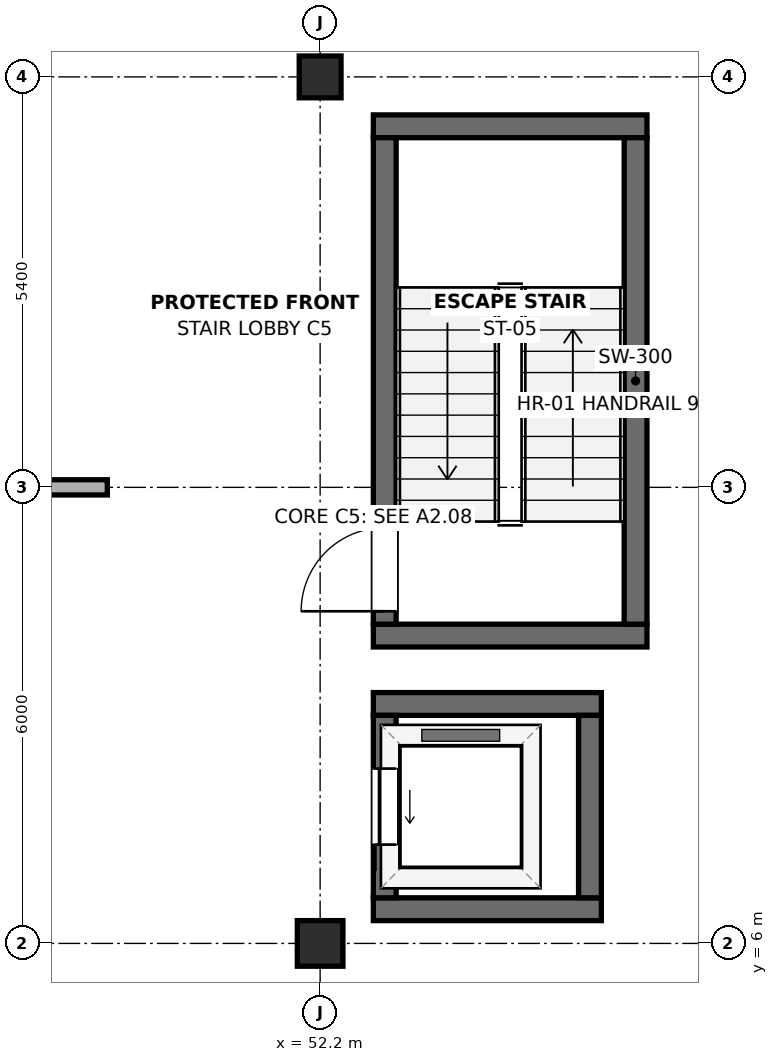
"""IFC4 building model, lengths in metres.
Left out: names, types, materials, properties, quantities, classifications, styles, units other than length and angle.
Written with IfcOpenShell. Run it as: python <this file> out.ifc"""

import sys

from ifc_helpers import new_model, si_unit, direction, frame, frame_2d, origin, origin_2d, place, context, subcontext, project, spatial, rectangle, extrude, element, fill, save


model = new_model("IFC4")
c1 = context("Model", 3, precision=1e-05, world=origin(), true_north=direction((0.0, 1.0)))
c2 = subcontext(c1, "Body", "Model", "MODEL_VIEW")
j1 = project(units=[si_unit("LENGTHUNIT", "METRE"), si_unit("PLANEANGLEUNIT", "RADIAN")], contexts=[c1])
p1 = place(None, origin())
s1 = spatial("IfcSite", under=j1, at=p1, CompositionType="ELEMENT")
p2 = place(p1, origin())
s2 = spatial("IfcBuilding", under=s1, at=p2, CompositionType="ELEMENT")
p3 = place(p2, frame((0.0, 0.0, -4.2)))
s3 = spatial("IfcBuildingStorey", under=s2, at=p3, CompositionType="ELEMENT", Elevation=-4.2)
p4 = place(p3, frame((52.2, 6.0, 0.0), z_axis=(0.0, 0.0, 1.0), x_axis=(1.0, 0.0, 0.0)))
e1 = element("IfcColumn", 1, at=p4, inside=s3, PredefinedType="COLUMN", context=c2, shape_type="SweptSolid", body=[
    extrude(rectangle(XDim=0.6, YDim=0.6, at=origin_2d()), origin(), (0.0, 0.0, 1.0), 4.2),
])
p5 = place(p3, frame((52.2, 17.4, 0.0), z_axis=(0.0, 0.0, 1.0), x_axis=(1.0, 0.0, 0.0)))
e2 = element("IfcColumn", 2, at=p5, inside=s3, PredefinedType="COLUMN", context=c2, shape_type="SweptSolid", body=[
    extrude(rectangle(XDim=0.55, YDim=0.55, at=origin_2d()), origin(), (0.0, 0.0, 1.0), 4.2),
])
for number, where, z_axis, x_axis in (
    (3, (52.9, 10.05, 0.0), (0.0, 0.0, 1.0), (1.0, 0.0, 0.0)),
    (4, (52.9, 16.75, 0.0), (0.0, 0.0, 1.0), (1.0, 0.0, 0.0)),
):
    element("IfcWall", number, at=place(p3, frame(where, z_axis=z_axis, x_axis=x_axis)), inside=s3, PredefinedType="SHEAR", context=c2, shape_type="SweptSolid", body=[
        extrude(rectangle(XDim=3.6, YDim=0.3, at=frame_2d((1.8, 0.0))), origin(), (0.0, 0.0, 1.0), 3.92),
    ])
p6 = place(p3, frame((53.05, 10.2, 0.0), z_axis=(0.0, 0.0, 1.0), x_axis=(0.0, 1.0, 0.0)))
e5 = element("IfcWall", 5, at=p6, inside=s3, PredefinedType="SHEAR", context=c2, shape_type="SweptSolid", body=[
    extrude(rectangle(XDim=6.4, YDim=0.3, at=frame_2d((3.2, 0.0))), origin(), (0.0, 0.0, 1.0), 3.92),
])
p7 = place(p6, frame((0.17, 0.0, 0.0)))
e6 = element("IfcOpeningElement", 6, at=p7, cuts=e5, PredefinedType="OPENING", context=c2, shape_type="SweptSolid", body=[
    extrude(rectangle(XDim=1.1, YDim=2.15, at=frame_2d((0.55, 1.075))), frame((0.0, 0.165, 0.0), z_axis=(0.0, -1.0, 0.0), x_axis=(1.0, 0.0, 0.0)), (0.0, 0.0, 1.0), 0.33),
])
p8 = place(p3, frame((56.35, 10.2, 0.0), z_axis=(0.0, 0.0, 1.0), x_axis=(0.0, 1.0, 0.0)))
e7 = element("IfcWall", 7, at=p8, inside=s3, PredefinedType="SHEAR", context=c2, shape_type="SweptSolid", body=[
    extrude(rectangle(XDim=6.4, YDim=0.3, at=frame_2d((3.2, 0.0))), origin(), (0.0, 0.0, 1.0), 3.92),
])
for number, where, z_axis, x_axis in (
    (8, (52.9, 6.45, 0.0), (0.0, 0.0, 1.0), (1.0, 0.0, 0.0)),
    (9, (52.9, 9.15, 0.0), (0.0, 0.0, 1.0), (1.0, 0.0, 0.0)),
):
    element("IfcWall", number, at=place(p3, frame(where, z_axis=z_axis, x_axis=x_axis)), inside=s3, PredefinedType="SHEAR", context=c2, shape_type="SweptSolid", body=[
        extrude(rectangle(XDim=3.0, YDim=0.3, at=frame_2d((1.5, 0.0))), origin(), (0.0, 0.0, 1.0), 3.92),
    ])
p9 = place(p3, frame((53.05, 6.6, 0.0), z_axis=(0.0, 0.0, 1.0), x_axis=(0.0, 1.0, 0.0)))
e10 = element("IfcWall", 10, at=p9, inside=s3, PredefinedType="SHEAR", context=c2, shape_type="SweptSolid", body=[
    extrude(rectangle(XDim=2.4, YDim=0.3, at=frame_2d((1.2, 0.0))), origin(), (0.0, 0.0, 1.0), 3.92),
])
p10 = place(p9, frame((0.7, 0.0, 0.0)))
e11 = element("IfcOpeningElement", 11, at=p10, cuts=e10, PredefinedType="OPENING", context=c2, shape_type="SweptSolid", body=[
    extrude(rectangle(XDim=1.0, YDim=2.15, at=frame_2d((0.5, 1.075))), frame((0.0, 0.165, 0.0), z_axis=(0.0, -1.0, 0.0), x_axis=(1.0, 0.0, 0.0)), (0.0, 0.0, 1.0), 0.33),
])
p11 = place(p3, frame((55.75, 6.6, 0.0), z_axis=(0.0, 0.0, 1.0), x_axis=(0.0, 1.0, 0.0)))
e12 = element("IfcWall", 12, at=p11, inside=s3, PredefinedType="SHEAR", context=c2, shape_type="SweptSolid", body=[
    extrude(rectangle(XDim=2.4, YDim=0.3, at=frame_2d((1.2, 0.0))), origin(), (0.0, 0.0, 1.0), 3.92),
])
p12 = place(p3, frame((34.2, 12.0, 0.0), z_axis=(0.0, 0.0, 1.0), x_axis=(1.0, 0.0, 0.0)))
e13 = element("IfcWall", 13, at=p12, inside=s3, PredefinedType="PARTITIONING", context=c2, shape_type="SweptSolid", body=[
    extrude(rectangle(XDim=15.2, YDim=0.2, at=frame_2d((7.6, 0.0))), origin(), (0.0, 0.0, 1.0), 3.015),
])
p13 = place(p12, frame((8.25, 0.0, 0.0)))
e14 = element("IfcOpeningElement", 14, at=p13, cuts=e13, PredefinedType="OPENING", context=c2, shape_type="SweptSolid", body=[
    extrude(rectangle(XDim=1.5, YDim=2.15, at=frame_2d((0.75, 1.075))), frame((0.0, 0.115, 0.0), z_axis=(0.0, -1.0, 0.0), x_axis=(1.0, 0.0, 0.0)), (0.0, 0.0, 1.0), 0.23),
])
p14 = place(p7, origin())
e15 = element("IfcDoor", 15, at=p14, inside=s3, OperationType="SINGLE_SWING_LEFT", PredefinedType="DOOR", context=c2, shape_type="SweptSolid", body=[
    extrude(rectangle(XDim=1.1, YDim=2.15, at=frame_2d((0.55, 1.075))), frame((0.0, 0.025, 0.0), z_axis=(0.0, -1.0, 0.0), x_axis=(1.0, 0.0, 0.0)), (0.0, 0.0, 1.0), 0.05),
])
fill(e6, e15)
p15 = place(p10, origin())
e16 = element("IfcDoor", 16, at=p15, inside=s3, OperationType="SLIDING_TO_LEFT", PredefinedType="DOOR", context=c2, shape_type="SweptSolid", body=[
    extrude(rectangle(XDim=1.0, YDim=2.15, at=frame_2d((0.5, 1.075))), frame((0.0, 0.025, 0.0), z_axis=(0.0, -1.0, 0.0), x_axis=(1.0, 0.0, 0.0)), (0.0, 0.0, 1.0), 0.05),
])
fill(e11, e16)
save(model, sys.argv[1])
